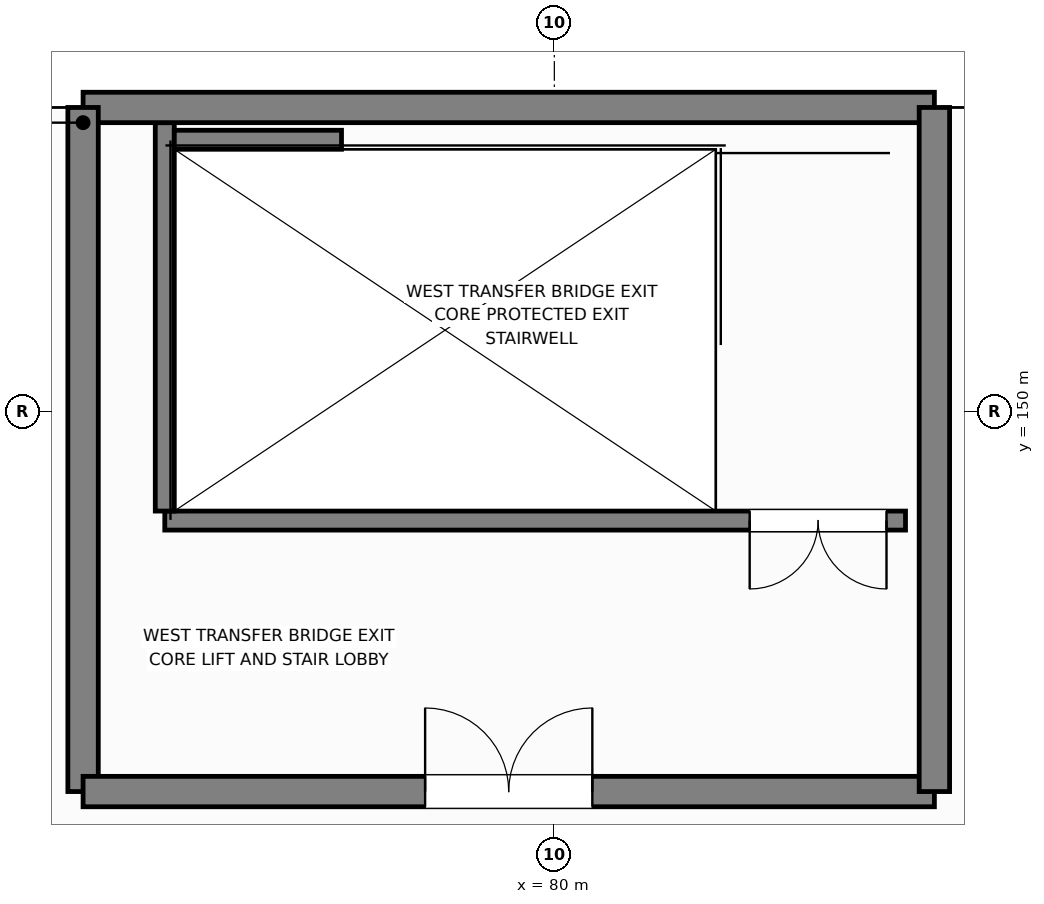
"""IFC4 building model, lengths in metres.
Left out: names, types, materials, properties, quantities, classifications, styles, units other than length and angle.
Written with IfcOpenShell. Run it as: python <this file> out.ifc"""

import sys

from ifc_helpers import new_model, si_unit, direction, frame, frame_2d, origin, place, context, subcontext, project, spatial, rectangle, extrude, element, fill, save


model = new_model("IFC4")
c1 = context("Model", 3, precision=1e-05, world=origin(), true_north=direction((0.0, 1.0)))
c2 = subcontext(c1, "Body", "Model", "MODEL_VIEW")
j1 = project(units=[si_unit("LENGTHUNIT", "METRE"), si_unit("PLANEANGLEUNIT", "RADIAN")], contexts=[c1])
p1 = place(None, origin())
s1 = spatial("IfcSite", under=j1, at=p1, CompositionType="ELEMENT")
p2 = place(p1, origin())
s2 = spatial("IfcBuilding", under=s1, at=p2, CompositionType="ELEMENT")
p3 = place(p2, frame((0.0, 0.0, 6.0)))
s3 = spatial("IfcBuildingStorey", under=s2, at=p3, CompositionType="ELEMENT", Elevation=6.0)
p4 = place(p3, frame((84.62, 148.565, 0.0), z_axis=(0.0, 0.0, 1.0), x_axis=(-1.0, 0.0, 0.0)))
e1 = element("IfcWall", 1, at=p4, inside=s3, PredefinedType="SOLIDWALL", context=c2, shape_type="SweptSolid", body=[
    extrude(rectangle(XDim=9.745, YDim=0.25, at=frame_2d((4.872, 0.0))), origin(), (0.0, 0.0, 1.0), 5.05),
])
p5 = place(p4, frame((0.25, 0.0, 0.0)))
e2 = element("IfcOpeningElement", 2, at=p5, cuts=e1, PredefinedType="OPENING", context=c2, shape_type="SweptSolid", body=[
    extrude(rectangle(XDim=1.8, YDim=2.25, at=frame_2d((0.9, 1.125))), frame((0.0, 0.135, 0.0), z_axis=(0.0, -1.0, 0.0), x_axis=(1.0, 0.0, 0.0)), (0.0, 0.0, 1.0), 0.27),
])
p6 = place(p3, frame((74.875, 153.8, 0.0), z_axis=(0.0, 0.0, 1.0), x_axis=(0.0, -1.0, 0.0)))
e3 = element("IfcWall", 3, at=p6, inside=s3, PredefinedType="SOLIDWALL", context=c2, shape_type="SweptSolid", body=[
    extrude(rectangle(XDim=5.11, YDim=0.25, at=frame_2d((2.555, 0.0))), origin(), (0.0, 0.0, 1.0), 5.05),
])
p7 = place(p3, frame((77.2, 153.575, 0.0), z_axis=(0.0, 0.0, 1.0), x_axis=(-1.0, 0.0, 0.0)))
e4 = element("IfcWall", 4, at=p7, inside=s3, PredefinedType="SOLIDWALL", context=c2, shape_type="SweptSolid", body=[
    extrude(rectangle(XDim=2.2, YDim=0.25, at=frame_2d((1.1, 0.0))), origin(), (0.0, 0.0, 1.0), 5.05),
])
p8 = place(p3, frame((85.0, 154.0, 0.0), z_axis=(0.0, 0.0, 1.0), x_axis=(-1.0, 0.0, 0.0)))
e5 = element("IfcWall", 5, at=p8, inside=s3, PredefinedType="SHEAR", context=c2, shape_type="SweptSolid", body=[
    extrude(rectangle(XDim=11.2, YDim=0.4, at=frame_2d((5.6, 0.0))), origin(), (0.0, 0.0, 1.0), 5.05),
])
p9 = place(p3, frame((73.8, 154.0, 0.0), z_axis=(0.0, 0.0, 1.0), x_axis=(0.0, -1.0, 0.0)))
e6 = element("IfcWall", 6, at=p9, inside=s3, PredefinedType="SHEAR", context=c2, shape_type="SweptSolid", body=[
    extrude(rectangle(XDim=9.0, YDim=0.4, at=frame_2d((4.5, 0.0))), origin(), (0.0, 0.0, 1.0), 5.05),
])
p10 = place(p3, frame((73.8, 145.0, 0.0), z_axis=(0.0, 0.0, 1.0), x_axis=(1.0, 0.0, 0.0)))
e7 = element("IfcWall", 7, at=p10, inside=s3, PredefinedType="SHEAR", context=c2, shape_type="SweptSolid", body=[
    extrude(rectangle(XDim=11.2, YDim=0.4, at=frame_2d((5.6, 0.0))), origin(), (0.0, 0.0, 1.0), 5.05),
])
p11 = place(p10, frame((4.5, 0.0, 0.0)))
e8 = element("IfcOpeningElement", 8, at=p11, cuts=e7, PredefinedType="OPENING", context=c2, shape_type="SweptSolid", body=[
    extrude(rectangle(XDim=2.2, YDim=2.3, at=frame_2d((1.1, 1.15))), frame((0.0, 0.21, 0.0), z_axis=(0.0, -1.0, 0.0), x_axis=(1.0, 0.0, 0.0)), (0.0, 0.0, 1.0), 0.42),
])
p12 = place(p3, frame((85.0, 145.0, 0.0), z_axis=(0.0, 0.0, 1.0), x_axis=(0.0, 1.0, 0.0)))
e9 = element("IfcWall", 9, at=p12, inside=s3, PredefinedType="SHEAR", context=c2, shape_type="SweptSolid", body=[
    extrude(rectangle(XDim=9.0, YDim=0.4, at=frame_2d((4.5, 0.0))), origin(), (0.0, 0.0, 1.0), 5.05),
])
p13 = place(p5, origin())
e10 = element("IfcDoor", 10, at=p13, inside=s3, OperationType="DOUBLE_DOOR_SINGLE_SWING", PredefinedType="DOOR", context=c2, shape_type="SweptSolid", body=[
    extrude(rectangle(XDim=1.8, YDim=2.25, at=frame_2d((0.9, 1.125))), frame((0.0, 0.025, 0.0), z_axis=(0.0, -1.0, 0.0), x_axis=(1.0, 0.0, 0.0)), (0.0, 0.0, 1.0), 0.05),
])
fill(e2, e10)
p14 = place(p11, origin())
e11 = element("IfcDoor", 11, at=p14, inside=s3, OperationType="DOUBLE_DOOR_SINGLE_SWING", PredefinedType="DOOR", context=c2, shape_type="SweptSolid", body=[
    extrude(rectangle(XDim=2.2, YDim=2.3, at=frame_2d((1.1, 1.15))), frame((0.0, 0.025, 0.0), z_axis=(0.0, -1.0, 0.0), x_axis=(1.0, 0.0, 0.0)), (0.0, 0.0, 1.0), 0.05),
])
fill(e8, e11)
save(model, sys.argv[1])
